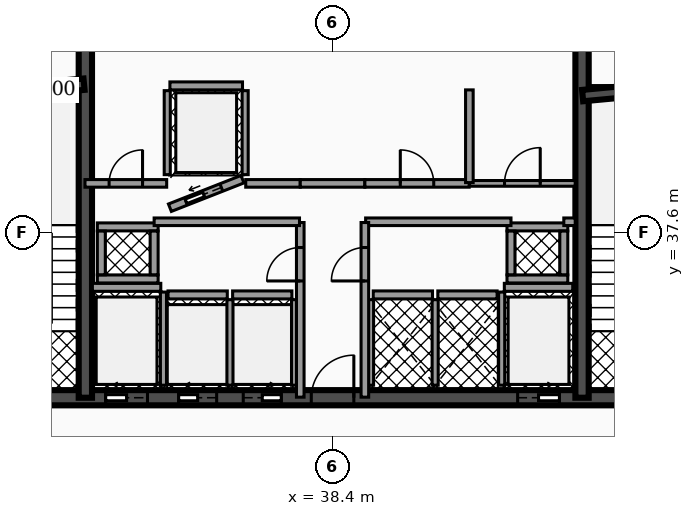
"""IFC4 building model, lengths in metres.
Left out: names, types, materials, properties, quantities, classifications, styles, units other than length and angle.
Written with IfcOpenShell. Run it as: python <this file> out.ifc"""

import sys

from ifc_helpers import new_model, si_unit, direction, frame, frame_2d, origin, place, context, subcontext, project, spatial, rectangle, extrude, element, fill, save


model = new_model("IFC4")
c1 = context("Model", 3, precision=1e-05, world=origin(), true_north=direction((0.0, 1.0)))
c2 = subcontext(c1, "Body", "Model", "MODEL_VIEW")
j1 = project(units=[si_unit("LENGTHUNIT", "METRE"), si_unit("PLANEANGLEUNIT", "RADIAN")], contexts=[c1])
p1 = place(None, origin())
s1 = spatial("IfcSite", under=j1, at=p1, CompositionType="ELEMENT")
p2 = place(p1, origin())
s2 = spatial("IfcBuilding", under=s1, at=p2, CompositionType="ELEMENT")
p3 = place(p2, frame((0.0, 0.0, 134.64)))
s3 = spatial("IfcBuildingStorey", under=s2, at=p3, CompositionType="ELEMENT", Elevation=134.64)
p4 = place(p3, frame((28.4, 33.25, 0.0), z_axis=(0.0, 0.0, 1.0), x_axis=(1.0, 0.0, 0.0)))
e1 = element("IfcWall", 1, at=p4, inside=s3, PredefinedType="SHEAR", context=c2, shape_type="SweptSolid", body=[
    extrude(rectangle(XDim=20.06, YDim=0.4, at=frame_2d((10.03, 0.0))), origin(), (0.0, 0.0, 1.0), 3.5),
])
p5 = place(p4, frame((4.03, 0.0, 0.0)))
e2 = element("IfcOpeningElement", 2, at=p5, cuts=e1, PredefinedType="OPENING", context=c2, shape_type="SweptSolid", body=[
    extrude(rectangle(XDim=1.1, YDim=2.15, at=frame_2d((0.55, 1.075))), frame((0.0, 0.21, 0.0), z_axis=(0.0, -1.0, 0.0), x_axis=(1.0, 0.0, 0.0)), (0.0, 0.0, 1.0), 0.42),
])
p6 = place(p4, frame((14.87, 0.0, 0.0)))
e3 = element("IfcOpeningElement", 3, at=p6, cuts=e1, PredefinedType="OPENING", context=c2, shape_type="SweptSolid", body=[
    extrude(rectangle(XDim=1.1, YDim=2.15, at=frame_2d((0.55, 1.075))), frame((0.0, 0.21, 0.0), z_axis=(0.0, -1.0, 0.0), x_axis=(1.0, 0.0, 0.0)), (0.0, 0.0, 1.0), 0.42),
])
p7 = place(p4, frame((5.95, 0.0, 0.0)))
e4 = element("IfcOpeningElement", 4, at=p7, cuts=e1, PredefinedType="OPENING", context=c2, shape_type="SweptSolid", body=[
    extrude(rectangle(XDim=1.0, YDim=2.1, at=frame_2d((0.5, 1.05))), frame((0.0, 0.21, 0.0), z_axis=(0.0, -1.0, 0.0), x_axis=(1.0, 0.0, 0.0)), (0.0, 0.0, 1.0), 0.42),
])
p8 = place(p4, frame((7.65, 0.0, 0.0)))
e5 = element("IfcOpeningElement", 5, at=p8, cuts=e1, PredefinedType="OPENING", context=c2, shape_type="SweptSolid", body=[
    extrude(rectangle(XDim=1.0, YDim=2.1, at=frame_2d((0.5, 1.05))), frame((0.0, 0.21, 0.0), z_axis=(0.0, -1.0, 0.0), x_axis=(1.0, 0.0, 0.0)), (0.0, 0.0, 1.0), 0.42),
])
p9 = place(p4, frame((1.31, 0.0, 0.0)))
e6 = element("IfcOpeningElement", 6, at=p9, cuts=e1, PredefinedType="OPENING", context=c2, shape_type="SweptSolid", body=[
    extrude(rectangle(XDim=1.1, YDim=2.2, at=frame_2d((0.55, 1.1))), frame((0.0, 0.21, 0.0), z_axis=(0.0, -1.0, 0.0), x_axis=(1.0, 0.0, 0.0)), (0.0, 0.0, 1.0), 0.42),
])
p10 = place(p4, frame((9.44, 0.0, 0.0)))
e7 = element("IfcOpeningElement", 7, at=p10, cuts=e1, PredefinedType="OPENING", context=c2, shape_type="SweptSolid", body=[
    extrude(rectangle(XDim=1.12, YDim=2.05, at=frame_2d((0.56, 1.025))), frame((0.0, 0.21, 0.0), z_axis=(0.0, -1.0, 0.0), x_axis=(1.0, 0.0, 0.0)), (0.0, 0.0, 1.0), 0.42),
])
p11 = place(p4, frame((17.65, 0.0, 0.0)))
e8 = element("IfcOpeningElement", 8, at=p11, cuts=e1, PredefinedType="OPENING", context=c2, shape_type="SweptSolid", body=[
    extrude(rectangle(XDim=1.1, YDim=2.2, at=frame_2d((0.55, 1.1))), frame((0.0, 0.21, 0.0), z_axis=(0.0, -1.0, 0.0), x_axis=(1.0, 0.0, 0.0)), (0.0, 0.0, 1.0), 0.42),
])
for number, where, z_axis, x_axis in (
    (9, (31.895, 33.25, 0.0), (0.0, 0.0, 1.0), (0.0, 1.0, 0.0)),
    (10, (44.965, 33.25, 0.0), (0.0, 0.0, 1.0), (0.0, 1.0, 0.0)),
):
    element("IfcWall", number, at=place(p3, frame(where, z_axis=z_axis, x_axis=x_axis)), inside=s3, PredefinedType="SHEAR", context=c2, shape_type="SweptSolid", body=[
        extrude(rectangle(XDim=10.2, YDim=0.35, at=frame_2d((5.1, 0.0))), origin(), (0.0, 0.0, 1.0), 3.5),
    ])
p12 = place(p3, frame((28.64, 41.2, 0.0), z_axis=(0.0, 0.0, 1.0), x_axis=(0.995687118776, 0.092774789157, 0.0)))
e11 = element("IfcWall", 11, at=p12, inside=s3, PredefinedType="SHEAR", context=c2, shape_type="SweptSolid", body=[
    extrude(rectangle(XDim=3.234, YDim=0.3, at=frame_2d((1.617, 0.0))), origin(), (0.0, 0.0, 1.0), 3.5),
])
p13 = place(p3, frame((44.98, 41.2, 0.0), z_axis=(0.0, 0.0, 1.0), x_axis=(0.995686468965, 0.09278176286, 0.0)))
e12 = element("IfcWall", 12, at=p13, inside=s3, PredefinedType="SHEAR", context=c2, shape_type="SweptSolid", body=[
    extrude(rectangle(XDim=3.234, YDim=0.3, at=frame_2d((1.617, 0.0))), origin(), (0.0, 0.0, 1.0), 3.5),
])
p14 = place(p3, frame((32.08, 36.155, 0.0), z_axis=(0.0, 0.0, 1.0), x_axis=(1.0, 0.0, 0.0)))
e13 = element("IfcWall", 13, at=p14, inside=s3, PredefinedType="SOLIDWALL", context=c2, shape_type="SweptSolid", body=[
    extrude(rectangle(XDim=1.8, YDim=0.21, at=frame_2d((0.9, 0.0))), origin(), (0.0, 0.0, 1.0), 2.472),
])
p15 = place(p3, frame((33.95, 33.58, 0.0), z_axis=(0.0, 0.0, 1.0), x_axis=(0.0, 1.0, 0.0)))
e14 = element("IfcWall", 14, at=p15, inside=s3, PredefinedType="SOLIDWALL", context=c2, shape_type="SweptSolid", body=[
    extrude(rectangle(XDim=2.45, YDim=0.16, at=frame_2d((1.225, 0.0))), origin(), (0.0, 0.0, 1.0), 2.472),
])
p16 = place(p3, frame((42.92, 36.155, 0.0), z_axis=(0.0, 0.0, 1.0), x_axis=(1.0, 0.0, 0.0)))
e15 = element("IfcWall", 15, at=p16, inside=s3, PredefinedType="SOLIDWALL", context=c2, shape_type="SweptSolid", body=[
    extrude(rectangle(XDim=1.8, YDim=0.21, at=frame_2d((0.9, 0.0))), origin(), (0.0, 0.0, 1.0), 2.472),
])
p17 = place(p3, frame((42.85, 33.58, 0.0), z_axis=(0.0, 0.0, 1.0), x_axis=(0.0, 1.0, 0.0)))
e16 = element("IfcWall", 16, at=p17, inside=s3, PredefinedType="SOLIDWALL", context=c2, shape_type="SweptSolid", body=[
    extrude(rectangle(XDim=2.45, YDim=0.16, at=frame_2d((1.225, 0.0))), origin(), (0.0, 0.0, 1.0), 2.472),
])
p18 = place(p3, frame((34.07, 35.955, 0.0), z_axis=(0.0, 0.0, 1.0), x_axis=(1.0, 0.0, 0.0)))
e17 = element("IfcWall", 17, at=p18, inside=s3, PredefinedType="SOLIDWALL", context=c2, shape_type="SweptSolid", body=[
    extrude(rectangle(XDim=1.56, YDim=0.21, at=frame_2d((0.78, 0.0))), origin(), (0.0, 0.0, 1.0), 2.472),
])
p19 = place(p3, frame((35.7, 33.58, 0.0), z_axis=(0.0, 0.0, 1.0), x_axis=(0.0, 1.0, 0.0)))
e18 = element("IfcWall", 18, at=p19, inside=s3, PredefinedType="SOLIDWALL", context=c2, shape_type="SweptSolid", body=[
    extrude(rectangle(XDim=2.25, YDim=0.16, at=frame_2d((1.125, 0.0))), origin(), (0.0, 0.0, 1.0), 2.472),
])
p20 = place(p3, frame((35.77, 35.955, 0.0), z_axis=(0.0, 0.0, 1.0), x_axis=(1.0, 0.0, 0.0)))
e19 = element("IfcWall", 19, at=p20, inside=s3, PredefinedType="SOLIDWALL", context=c2, shape_type="SweptSolid", body=[
    extrude(rectangle(XDim=1.56, YDim=0.21, at=frame_2d((0.78, 0.0))), origin(), (0.0, 0.0, 1.0), 2.472),
])
p21 = place(p3, frame((37.4, 33.58, 0.0), z_axis=(0.0, 0.0, 1.0), x_axis=(0.0, 1.0, 0.0)))
e20 = element("IfcWall", 20, at=p21, inside=s3, PredefinedType="SOLIDWALL", context=c2, shape_type="SweptSolid", body=[
    extrude(rectangle(XDim=2.25, YDim=0.16, at=frame_2d((1.125, 0.0))), origin(), (0.0, 0.0, 1.0), 2.472),
])
p22 = place(p3, frame((34.12, 38.25, 0.0), z_axis=(0.0, 0.0, 1.0), x_axis=(0.930804993012, 0.36551616241, 0.0)))
e21 = element("IfcWall", 21, at=p22, inside=s3, PredefinedType="SOLIDWALL", context=c2, shape_type="SweptSolid", body=[
    extrude(rectangle(XDim=2.052, YDim=0.21, at=frame_2d((1.026, 0.0))), origin(), (0.0, 0.0, 1.0), 2.472),
])
p23 = place(p22, frame((0.455, 0.0, 0.0)))
e22 = element("IfcOpeningElement", 22, at=p23, cuts=e21, PredefinedType="OPENING", context=c2, shape_type="SweptSolid", body=[
    extrude(rectangle(XDim=1.0, YDim=2.1, at=frame_2d((0.5, 1.05))), frame((0.0, 0.115, 0.0), z_axis=(0.0, -1.0, 0.0), x_axis=(1.0, 0.0, 0.0)), (0.0, 0.0, 1.0), 0.23),
])
p24 = place(p3, frame((34.12, 41.455, 0.0), z_axis=(0.0, 0.0, 1.0), x_axis=(1.0, 0.0, 0.0)))
e23 = element("IfcWall", 23, at=p24, inside=s3, PredefinedType="SOLIDWALL", context=c2, shape_type="SweptSolid", body=[
    extrude(rectangle(XDim=1.91, YDim=0.21, at=frame_2d((0.955, 0.0))), origin(), (0.0, 0.0, 1.0), 2.472),
])
for number, where, z_axis, x_axis in (
    (24, (34.05, 39.12, 0.0), (0.0, 0.0, 1.0), (0.0, 1.0, 0.0)),
    (25, (36.1, 39.12, 0.0), (0.0, 0.0, 1.0), (0.0, 1.0, 0.0)),
):
    element("IfcWall", number, at=place(p3, frame(where, z_axis=z_axis, x_axis=x_axis)), inside=s3, PredefinedType="SOLIDWALL", context=c2, shape_type="SweptSolid", body=[
        extrude(rectangle(XDim=2.21, YDim=0.16, at=frame_2d((1.105, 0.0))), origin(), (0.0, 0.0, 1.0), 2.472),
    ])
p25 = place(p3, frame((39.47, 35.955, 0.0), z_axis=(0.0, 0.0, 1.0), x_axis=(1.0, 0.0, 0.0)))
e26 = element("IfcWall", 26, at=p25, inside=s3, PredefinedType="SOLIDWALL", context=c2, shape_type="SweptSolid", body=[
    extrude(rectangle(XDim=1.56, YDim=0.21, at=frame_2d((0.78, 0.0))), origin(), (0.0, 0.0, 1.0), 2.472),
])
for number, where, z_axis, x_axis in (
    (27, (39.4, 33.58, 0.0), (0.0, 0.0, 1.0), (0.0, 1.0, 0.0)),
    (28, (41.1, 33.58, 0.0), (0.0, 0.0, 1.0), (0.0, 1.0, 0.0)),
):
    element("IfcWall", number, at=place(p3, frame(where, z_axis=z_axis, x_axis=x_axis)), inside=s3, PredefinedType="SOLIDWALL", context=c2, shape_type="SweptSolid", body=[
        extrude(rectangle(XDim=2.25, YDim=0.16, at=frame_2d((1.125, 0.0))), origin(), (0.0, 0.0, 1.0), 2.472),
    ])
p26 = place(p3, frame((41.17, 35.955, 0.0), z_axis=(0.0, 0.0, 1.0), x_axis=(1.0, 0.0, 0.0)))
e29 = element("IfcWall", 29, at=p26, inside=s3, PredefinedType="SOLIDWALL", context=c2, shape_type="SweptSolid", body=[
    extrude(rectangle(XDim=1.56, YDim=0.21, at=frame_2d((0.78, 0.0))), origin(), (0.0, 0.0, 1.0), 2.472),
])
for number, where, z_axis, x_axis in (
    (30, (32.21, 36.375, 0.0), (0.0, 0.0, 1.0), (1.0, 0.0, 0.0)),
    (31, (32.21, 37.745, 0.0), (0.0, 0.0, 1.0), (1.0, 0.0, 0.0)),
):
    element("IfcWall", number, at=place(p3, frame(where, z_axis=z_axis, x_axis=x_axis)), inside=s3, PredefinedType="SOLIDWALL", context=c2, shape_type="SweptSolid", body=[
        extrude(rectangle(XDim=1.6, YDim=0.21, at=frame_2d((0.8, 0.0))), origin(), (0.0, 0.0, 1.0), 3.5),
    ])
for number, where, z_axis, x_axis in (
    (32, (32.315, 36.485, 0.0), (0.0, 0.0, 1.0), (0.0, 1.0, 0.0)),
    (33, (33.705, 36.485, 0.0), (0.0, 0.0, 1.0), (0.0, 1.0, 0.0)),
):
    element("IfcWall", number, at=place(p3, frame(where, z_axis=z_axis, x_axis=x_axis)), inside=s3, PredefinedType="SOLIDWALL", context=c2, shape_type="SweptSolid", body=[
        extrude(rectangle(XDim=1.15, YDim=0.21, at=frame_2d((0.575, 0.0))), origin(), (0.0, 0.0, 1.0), 3.5),
    ])
for number, where, z_axis, x_axis in (
    (34, (42.99, 36.375, 0.0), (0.0, 0.0, 1.0), (1.0, 0.0, 0.0)),
    (35, (42.99, 37.745, 0.0), (0.0, 0.0, 1.0), (1.0, 0.0, 0.0)),
):
    element("IfcWall", number, at=place(p3, frame(where, z_axis=z_axis, x_axis=x_axis)), inside=s3, PredefinedType="SOLIDWALL", context=c2, shape_type="SweptSolid", body=[
        extrude(rectangle(XDim=1.6, YDim=0.21, at=frame_2d((0.8, 0.0))), origin(), (0.0, 0.0, 1.0), 3.5),
    ])
for number, where, z_axis, x_axis in (
    (36, (43.095, 36.485, 0.0), (0.0, 0.0, 1.0), (0.0, 1.0, 0.0)),
    (37, (44.485, 36.485, 0.0), (0.0, 0.0, 1.0), (0.0, 1.0, 0.0)),
):
    element("IfcWall", number, at=place(p3, frame(where, z_axis=z_axis, x_axis=x_axis)), inside=s3, PredefinedType="SOLIDWALL", context=c2, shape_type="SweptSolid", body=[
        extrude(rectangle(XDim=1.15, YDim=0.21, at=frame_2d((0.575, 0.0))), origin(), (0.0, 0.0, 1.0), 3.5),
    ])
p27 = place(p3, frame((37.55, 33.265, 0.0), z_axis=(0.0, 0.0, 1.0), x_axis=(0.0, 1.0, 0.0)))
e38 = element("IfcWall", 38, at=p27, inside=s3, PredefinedType="PARTITIONING", context=c2, shape_type="SweptSolid", body=[
    extrude(rectangle(XDim=4.595, YDim=0.2, at=frame_2d((2.298, 0.0))), origin(), (0.0, 0.0, 1.0), 2.457),
])
p28 = place(p27, frame((3.058, 0.0, 0.0)))
e39 = element("IfcOpeningElement", 39, at=p28, cuts=e38, PredefinedType="OPENING", context=c2, shape_type="SweptSolid", body=[
    extrude(rectangle(XDim=0.88, YDim=2.05, at=frame_2d((0.44, 1.025))), frame((0.0, 0.11, 0.0), z_axis=(0.0, -1.0, 0.0), x_axis=(1.0, 0.0, 0.0)), (0.0, 0.0, 1.0), 0.22),
])
p29 = place(p3, frame((33.705, 37.88, 0.0), z_axis=(0.0, 0.0, 1.0), x_axis=(1.0, 0.0, 0.0)))
e40 = element("IfcWall", 40, at=p29, inside=s3, PredefinedType="PARTITIONING", context=c2, shape_type="SweptSolid", body=[
    extrude(rectangle(XDim=3.825, YDim=0.2, at=frame_2d((1.913, 0.0))), origin(), (0.0, 0.0, 1.0), 2.457),
])
p30 = place(p3, frame((31.885, 38.89, 0.0), z_axis=(0.0, 0.0, 1.0), x_axis=(1.0, 0.0, 0.0)))
e41 = element("IfcWall", 41, at=p30, inside=s3, PredefinedType="PARTITIONING", context=c2, shape_type="SweptSolid", body=[
    extrude(rectangle(XDim=2.15, YDim=0.2, at=frame_2d((1.075, 0.0))), origin(), (0.0, 0.0, 1.0), 2.457),
])
p31 = place(p30, frame((0.635, 0.0, 0.0)))
e42 = element("IfcOpeningElement", 42, at=p31, cuts=e41, PredefinedType="OPENING", context=c2, shape_type="SweptSolid", body=[
    extrude(rectangle(XDim=0.88, YDim=2.05, at=frame_2d((0.44, 1.025))), frame((0.0, 0.11, 0.0), z_axis=(0.0, -1.0, 0.0), x_axis=(1.0, 0.0, 0.0)), (0.0, 0.0, 1.0), 0.22),
])
p32 = place(p3, frame((36.115, 38.89, 0.0), z_axis=(0.0, 0.0, 1.0), x_axis=(1.0, 0.0, 0.0)))
e43 = element("IfcWall", 43, at=p32, inside=s3, PredefinedType="PARTITIONING", context=c2, shape_type="SweptSolid", body=[
    extrude(rectangle(XDim=1.435, YDim=0.2, at=frame_2d((0.718, 0.0))), origin(), (0.0, 0.0, 1.0), 2.457),
])
p33 = place(p3, frame((37.55, 38.89, 0.0), z_axis=(0.0, 0.0, 1.0), x_axis=(1.0, 0.0, 0.0)))
e44 = element("IfcWall", 44, at=p33, inside=s3, PredefinedType="PARTITIONING", context=c2, shape_type="SweptSolid", body=[
    extrude(rectangle(XDim=1.7, YDim=0.2, at=frame_2d((0.85, 0.0))), origin(), (0.0, 0.0, 1.0), 2.457),
])
p34 = place(p3, frame((39.25, 38.89, 0.0), z_axis=(0.0, 0.0, 1.0), x_axis=(1.0, 0.0, 0.0)))
e45 = element("IfcWall", 45, at=p34, inside=s3, PredefinedType="PARTITIONING", context=c2, shape_type="SweptSolid", body=[
    extrude(rectangle(XDim=2.745, YDim=0.2, at=frame_2d((1.373, 0.0))), origin(), (0.0, 0.0, 1.0), 2.457),
])
p35 = place(p34, frame((0.933, 0.0, 0.0)))
e46 = element("IfcOpeningElement", 46, at=p35, cuts=e45, PredefinedType="OPENING", context=c2, shape_type="SweptSolid", body=[
    extrude(rectangle(XDim=0.88, YDim=2.05, at=frame_2d((0.44, 1.025))), frame((0.0, 0.11, 0.0), z_axis=(0.0, -1.0, 0.0), x_axis=(1.0, 0.0, 0.0)), (0.0, 0.0, 1.0), 0.22),
])
p36 = place(p3, frame((42.005, 38.89, 0.0), z_axis=(0.0, 0.0, 1.0), x_axis=(1.0, 0.0, 0.0)))
e47 = element("IfcWall", 47, at=p36, inside=s3, PredefinedType="PARTITIONING", context=c2, shape_type="SweptSolid", body=[
    extrude(rectangle(XDim=2.78, YDim=0.15, at=frame_2d((1.39, 0.0))), origin(), (0.0, 0.0, 1.0), 2.457),
])
p37 = place(p36, frame((0.92, 0.0, 0.0)))
e48 = element("IfcOpeningElement", 48, at=p37, cuts=e47, PredefinedType="OPENING", context=c2, shape_type="SweptSolid", body=[
    extrude(rectangle(XDim=0.94, YDim=2.05, at=frame_2d((0.47, 1.025))), frame((0.0, 0.085, 0.0), z_axis=(0.0, -1.0, 0.0), x_axis=(1.0, 0.0, 0.0)), (0.0, 0.0, 1.0), 0.17),
])
p38 = place(p3, frame((39.27, 37.88, 0.0), z_axis=(0.0, 0.0, 1.0), x_axis=(1.0, 0.0, 0.0)))
e49 = element("IfcWall", 49, at=p38, inside=s3, PredefinedType="PARTITIONING", context=c2, shape_type="SweptSolid", body=[
    extrude(rectangle(XDim=3.825, YDim=0.2, at=frame_2d((1.913, 0.0))), origin(), (0.0, 0.0, 1.0), 2.457),
])
p39 = place(p3, frame((44.485, 37.88, 0.0), z_axis=(0.0, 0.0, 1.0), x_axis=(1.0, 0.0, 0.0)))
e50 = element("IfcWall", 50, at=p39, inside=s3, PredefinedType="PARTITIONING", context=c2, shape_type="SweptSolid", body=[
    extrude(rectangle(XDim=0.3, YDim=0.2, at=frame_2d((0.15, 0.0))), origin(), (0.0, 0.0, 1.0), 2.457),
])
p40 = place(p3, frame((39.25, 33.265, 0.0), z_axis=(0.0, 0.0, 1.0), x_axis=(0.0, 1.0, 0.0)))
e51 = element("IfcWall", 51, at=p40, inside=s3, PredefinedType="PARTITIONING", context=c2, shape_type="SweptSolid", body=[
    extrude(rectangle(XDim=4.595, YDim=0.2, at=frame_2d((2.298, 0.0))), origin(), (0.0, 0.0, 1.0), 2.457),
])
p41 = place(p40, frame((3.058, 0.0, 0.0)))
e52 = element("IfcOpeningElement", 52, at=p41, cuts=e51, PredefinedType="OPENING", context=c2, shape_type="SweptSolid", body=[
    extrude(rectangle(XDim=0.88, YDim=2.05, at=frame_2d((0.44, 1.025))), frame((0.0, 0.11, 0.0), z_axis=(0.0, -1.0, 0.0), x_axis=(1.0, 0.0, 0.0)), (0.0, 0.0, 1.0), 0.22),
])
p42 = place(p3, frame((42.0, 38.91, 0.0), z_axis=(0.0, 0.0, 1.0), x_axis=(0.0, 1.0, 0.0)))
e53 = element("IfcWall", 53, at=p42, inside=s3, PredefinedType="PARTITIONING", context=c2, shape_type="SweptSolid", body=[
    extrude(rectangle(XDim=2.44, YDim=0.2, at=frame_2d((1.22, 0.0))), origin(), (0.0, 0.0, 1.0), 2.457),
])
p43 = place(p5, origin())
e54 = element("IfcDoor", 54, at=p43, inside=s3, OperationType="SLIDING_TO_LEFT", PredefinedType="DOOR", context=c2, shape_type="SweptSolid", body=[
    extrude(rectangle(XDim=1.1, YDim=2.15, at=frame_2d((0.55, 1.075))), frame((0.0, 0.025, 0.0), z_axis=(0.0, -1.0, 0.0), x_axis=(1.0, 0.0, 0.0)), (0.0, 0.0, 1.0), 0.05),
])
fill(e2, e54)
p44 = place(p6, origin())
e55 = element("IfcDoor", 55, at=p44, inside=s3, OperationType="SLIDING_TO_RIGHT", PredefinedType="DOOR", context=c2, shape_type="SweptSolid", body=[
    extrude(rectangle(XDim=1.1, YDim=2.15, at=frame_2d((0.55, 1.075))), frame((0.0, 0.025, 0.0), z_axis=(0.0, -1.0, 0.0), x_axis=(1.0, 0.0, 0.0)), (0.0, 0.0, 1.0), 0.05),
])
fill(e3, e55)
p45 = place(p7, origin())
e56 = element("IfcDoor", 56, at=p45, inside=s3, OperationType="SLIDING_TO_LEFT", PredefinedType="DOOR", context=c2, shape_type="SweptSolid", body=[
    extrude(rectangle(XDim=1.0, YDim=2.1, at=frame_2d((0.5, 1.05))), frame((0.0, 0.025, 0.0), z_axis=(0.0, -1.0, 0.0), x_axis=(1.0, 0.0, 0.0)), (0.0, 0.0, 1.0), 0.05),
])
fill(e4, e56)
p46 = place(p8, origin())
e57 = element("IfcDoor", 57, at=p46, inside=s3, OperationType="SLIDING_TO_RIGHT", PredefinedType="DOOR", context=c2, shape_type="SweptSolid", body=[
    extrude(rectangle(XDim=1.0, YDim=2.1, at=frame_2d((0.5, 1.05))), frame((0.0, 0.025, 0.0), z_axis=(0.0, -1.0, 0.0), x_axis=(1.0, 0.0, 0.0)), (0.0, 0.0, 1.0), 0.05),
])
fill(e5, e57)
p47 = place(p23, origin())
e58 = element("IfcDoor", 58, at=p47, inside=s3, OperationType="SLIDING_TO_LEFT", PredefinedType="DOOR", context=c2, shape_type="SweptSolid", body=[
    extrude(rectangle(XDim=1.0, YDim=2.1, at=frame_2d((0.5, 1.05))), frame((0.0, 0.025, 0.0), z_axis=(0.0, -1.0, 0.0), x_axis=(1.0, 0.0, 0.0)), (0.0, 0.0, 1.0), 0.05),
])
fill(e22, e58)
p48 = place(p10, origin())
e59 = element("IfcDoor", 59, at=p48, inside=s3, OperationType="SINGLE_SWING_RIGHT", PredefinedType="DOOR", context=c2, shape_type="SweptSolid", body=[
    extrude(rectangle(XDim=1.12, YDim=2.05, at=frame_2d((0.56, 1.025))), frame((0.0, 0.025, 0.0), z_axis=(0.0, -1.0, 0.0), x_axis=(1.0, 0.0, 0.0)), (0.0, 0.0, 1.0), 0.05),
])
fill(e7, e59)
p49 = place(p28, origin())
e60 = element("IfcDoor", 60, at=p49, inside=s3, OperationType="SINGLE_SWING_LEFT", PredefinedType="DOOR", context=c2, shape_type="SweptSolid", body=[
    extrude(rectangle(XDim=0.88, YDim=2.05, at=frame_2d((0.44, 1.025))), frame((0.0, 0.025, 0.0), z_axis=(0.0, -1.0, 0.0), x_axis=(1.0, 0.0, 0.0)), (0.0, 0.0, 1.0), 0.05),
])
fill(e39, e60)
p50 = place(p31, origin())
e61 = element("IfcDoor", 61, at=p50, inside=s3, OperationType="SINGLE_SWING_RIGHT", PredefinedType="DOOR", context=c2, shape_type="SweptSolid", body=[
    extrude(rectangle(XDim=0.88, YDim=2.05, at=frame_2d((0.44, 1.025))), frame((0.0, 0.025, 0.0), z_axis=(0.0, -1.0, 0.0), x_axis=(1.0, 0.0, 0.0)), (0.0, 0.0, 1.0), 0.05),
])
fill(e42, e61)
p51 = place(p35, origin())
e62 = element("IfcDoor", 62, at=p51, inside=s3, OperationType="SINGLE_SWING_LEFT", PredefinedType="DOOR", context=c2, shape_type="SweptSolid", body=[
    extrude(rectangle(XDim=0.88, YDim=2.05, at=frame_2d((0.44, 1.025))), frame((0.0, 0.025, 0.0), z_axis=(0.0, -1.0, 0.0), x_axis=(1.0, 0.0, 0.0)), (0.0, 0.0, 1.0), 0.05),
])
fill(e46, e62)
p52 = place(p37, origin())
e63 = element("IfcDoor", 63, at=p52, inside=s3, OperationType="SINGLE_SWING_RIGHT", PredefinedType="DOOR", context=c2, shape_type="SweptSolid", body=[
    extrude(rectangle(XDim=0.94, YDim=2.05, at=frame_2d((0.47, 1.025))), frame((0.0, 0.025, 0.0), z_axis=(0.0, -1.0, 0.0), x_axis=(1.0, 0.0, 0.0)), (0.0, 0.0, 1.0), 0.05),
])
fill(e48, e63)
p53 = place(p41, origin())
e64 = element("IfcDoor", 64, at=p53, inside=s3, OperationType="SINGLE_SWING_LEFT", PredefinedType="DOOR", context=c2, shape_type="SweptSolid", body=[
    extrude(rectangle(XDim=0.88, YDim=2.05, at=frame_2d((0.44, 1.025))), frame((0.0, 0.025, 0.0), z_axis=(0.0, -1.0, 0.0), x_axis=(1.0, 0.0, 0.0)), (0.0, 0.0, 1.0), 0.05),
])
fill(e52, e64)
save(model, sys.argv[1])
